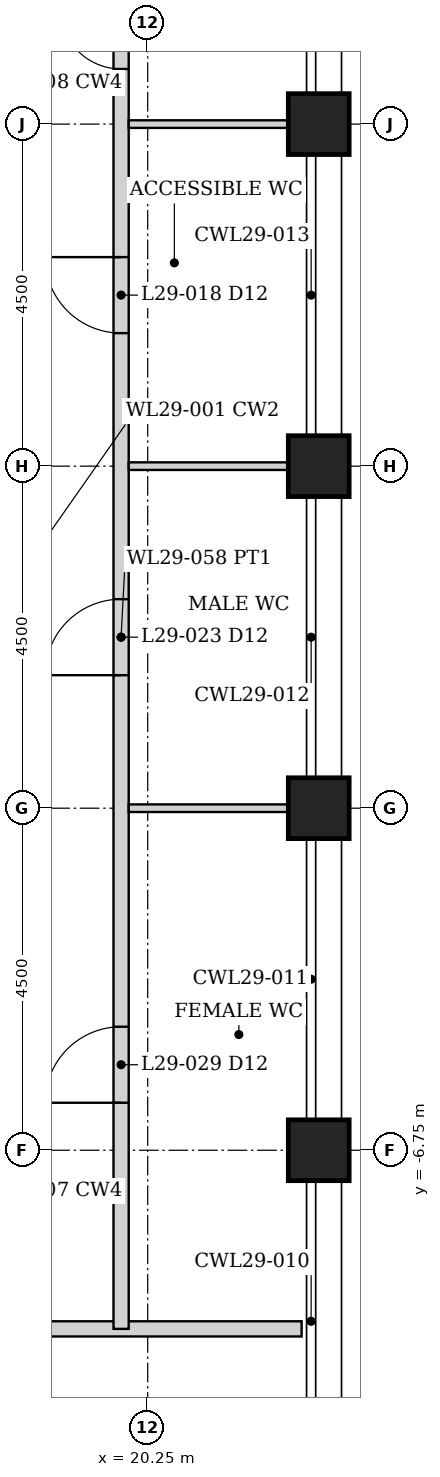
"""IFC4 building model, lengths in metres.
Left out: names, types, materials, properties, quantities, classifications, styles, units other than length and angle.
Written with IfcOpenShell. Run it as: python <this file> out.ifc"""

import sys

from ifc_helpers import new_model, si_unit, direction, frame, frame_2d, origin, origin_2d, place, context, subcontext, project, spatial, rectangle, hollow_rectangle, extrude, element, fill, save


model = new_model("IFC4")
c1 = context("Model", 3, precision=1e-05, world=origin(), true_north=direction((0.0, 1.0)))
c2 = subcontext(c1, "Body", "Model", "MODEL_VIEW")
j1 = project(units=[si_unit("LENGTHUNIT", "METRE"), si_unit("PLANEANGLEUNIT", "RADIAN")], contexts=[c1])
p1 = place(None, origin())
s1 = spatial("IfcSite", under=j1, at=p1, CompositionType="ELEMENT")
p2 = place(p1, origin())
s2 = spatial("IfcBuilding", under=s1, at=p2, CompositionType="ELEMENT")
p3 = place(p2, frame((0.0, 0.0, 112.4)))
s3 = spatial("IfcBuildingStorey", under=s2, at=p3, CompositionType="ELEMENT", Elevation=112.4)
for number, where, z_axis, x_axis in (
    (1, (22.5, -6.75, 0.0), (0.0, 0.0, 1.0), (1.0, 0.0, 0.0)),
    (2, (22.5, -2.25, 0.0), (0.0, 0.0, 1.0), (1.0, 0.0, 0.0)),
    (3, (22.5, 2.25, 0.0), (0.0, 0.0, 1.0), (1.0, 0.0, 0.0)),
    (4, (22.5, 6.75, 0.0), (0.0, 0.0, 1.0), (1.0, 0.0, 0.0)),
):
    element("IfcColumn", number, at=place(p3, frame(where, z_axis=z_axis, x_axis=x_axis)), inside=s3, PredefinedType="COLUMN", context=c2, shape_type="SweptSolid", body=[
        extrude(hollow_rectangle(XDim=0.8, YDim=0.8, WallThickness=0.06, at=origin_2d()), origin(), (0.0, 0.0, 1.0), 6.0),
    ])
p4 = place(p3, frame((-22.275, -9.1, 0.0), z_axis=(0.0, 0.0, 1.0), x_axis=(1.0, 0.0, 0.0)))
e5 = element("IfcWall", 5, at=p4, inside=s3, PredefinedType="PARTITIONING", context=c2, shape_type="SweptSolid", body=[
    extrude(rectangle(XDim=44.55, YDim=0.2, at=frame_2d((22.275, 0.0))), origin(), (0.0, 0.0, 1.0), 4.874),
])
p5 = place(p4, frame((3.348, 0.0, 0.0)))
e6 = element("IfcOpeningElement", 6, at=p5, cuts=e5, PredefinedType="OPENING", context=c2, shape_type="SweptSolid", body=[
    extrude(rectangle(XDim=0.9, YDim=2.1, at=frame_2d((0.45, 1.05))), frame((0.0, 0.11, 0.0), z_axis=(0.0, -1.0, 0.0), x_axis=(1.0, 0.0, 0.0)), (0.0, 0.0, 1.0), 0.22),
])
p6 = place(p4, frame((9.525, 0.0, 0.0)))
e7 = element("IfcOpeningElement", 7, at=p6, cuts=e5, PredefinedType="OPENING", context=c2, shape_type="SweptSolid", body=[
    extrude(rectangle(XDim=1.0, YDim=2.1, at=frame_2d((0.5, 1.05))), frame((0.0, 0.11, 0.0), z_axis=(0.0, -1.0, 0.0), x_axis=(1.0, 0.0, 0.0)), (0.0, 0.0, 1.0), 0.22),
])
p7 = place(p4, frame((13.75, 0.0, 0.0)))
e8 = element("IfcOpeningElement", 8, at=p7, cuts=e5, PredefinedType="OPENING", context=c2, shape_type="SweptSolid", body=[
    extrude(rectangle(XDim=0.8, YDim=2.1, at=frame_2d((0.4, 1.05))), frame((0.0, 0.11, 0.0), z_axis=(0.0, -1.0, 0.0), x_axis=(1.0, 0.0, 0.0)), (0.0, 0.0, 1.0), 0.22),
])
p8 = place(p4, frame((20.817, 0.0, 0.0)))
e9 = element("IfcOpeningElement", 9, at=p8, cuts=e5, PredefinedType="OPENING", context=c2, shape_type="SweptSolid", body=[
    extrude(rectangle(XDim=0.9, YDim=2.1, at=frame_2d((0.45, 1.05))), frame((0.0, 0.11, 0.0), z_axis=(0.0, -1.0, 0.0), x_axis=(1.0, 0.0, 0.0)), (0.0, 0.0, 1.0), 0.22),
])
p9 = place(p4, frame((26.3, 0.0, 0.0)))
e10 = element("IfcOpeningElement", 10, at=p9, cuts=e5, PredefinedType="OPENING", context=c2, shape_type="SweptSolid", body=[
    extrude(rectangle(XDim=0.9, YDim=2.1, at=frame_2d((0.45, 1.05))), frame((0.0, 0.11, 0.0), z_axis=(0.0, -1.0, 0.0), x_axis=(1.0, 0.0, 0.0)), (0.0, 0.0, 1.0), 0.22),
])
p10 = place(p4, frame((16.375, 0.0, 0.0)))
e11 = element("IfcOpeningElement", 11, at=p10, cuts=e5, PredefinedType="OPENING", context=c2, shape_type="SweptSolid", body=[
    extrude(rectangle(XDim=0.8, YDim=2.1, at=frame_2d((0.4, 1.05))), frame((0.0, 0.11, 0.0), z_axis=(0.0, -1.0, 0.0), x_axis=(1.0, 0.0, 0.0)), (0.0, 0.0, 1.0), 0.22),
])
p11 = place(p4, frame((39.811, 0.0, 0.0)))
e12 = element("IfcOpeningElement", 12, at=p11, cuts=e5, PredefinedType="OPENING", context=c2, shape_type="SweptSolid", body=[
    extrude(rectangle(XDim=0.9, YDim=2.1, at=frame_2d((0.45, 1.05))), frame((0.0, 0.11, 0.0), z_axis=(0.0, -1.0, 0.0), x_axis=(1.0, 0.0, 0.0)), (0.0, 0.0, 1.0), 0.22),
])
p12 = place(p4, frame((30.65, 0.0, 0.0)))
e13 = element("IfcOpeningElement", 13, at=p12, cuts=e5, PredefinedType="OPENING", context=c2, shape_type="SweptSolid", body=[
    extrude(rectangle(XDim=1.0, YDim=2.1, at=frame_2d((0.5, 1.05))), frame((0.0, 0.11, 0.0), z_axis=(0.0, -1.0, 0.0), x_axis=(1.0, 0.0, 0.0)), (0.0, 0.0, 1.0), 0.22),
])
p13 = place(p4, frame((34.275, 0.0, 0.0)))
e14 = element("IfcOpeningElement", 14, at=p13, cuts=e5, PredefinedType="OPENING", context=c2, shape_type="SweptSolid", body=[
    extrude(rectangle(XDim=1.0, YDim=2.1, at=frame_2d((0.5, 1.05))), frame((0.0, 0.11, 0.0), z_axis=(0.0, -1.0, 0.0), x_axis=(1.0, 0.0, 0.0)), (0.0, 0.0, 1.0), 0.22),
])
p14 = place(p3, frame((19.9, -9.1, 0.0), z_axis=(0.0, 0.0, 1.0), x_axis=(0.0, 1.0, 0.0)))
e15 = element("IfcWall", 15, at=p14, inside=s3, PredefinedType="PARTITIONING", context=c2, shape_type="SweptSolid", body=[
    extrude(rectangle(XDim=18.2, YDim=0.2, at=frame_2d((9.1, 0.0))), origin(), (0.0, 0.0, 1.0), 4.874),
])
p15 = place(p14, frame((2.975, 0.0, 0.0)))
e16 = element("IfcOpeningElement", 16, at=p15, cuts=e15, PredefinedType="OPENING", context=c2, shape_type="SweptSolid", body=[
    extrude(rectangle(XDim=1.0, YDim=2.1, at=frame_2d((0.5, 1.05))), frame((0.0, 0.11, 0.0), z_axis=(0.0, -1.0, 0.0), x_axis=(1.0, 0.0, 0.0)), (0.0, 0.0, 1.0), 0.22),
])
p16 = place(p14, frame((8.6, 0.0, 0.0)))
e17 = element("IfcOpeningElement", 17, at=p16, cuts=e15, PredefinedType="OPENING", context=c2, shape_type="SweptSolid", body=[
    extrude(rectangle(XDim=1.0, YDim=2.1, at=frame_2d((0.5, 1.05))), frame((0.0, 0.11, 0.0), z_axis=(0.0, -1.0, 0.0), x_axis=(1.0, 0.0, 0.0)), (0.0, 0.0, 1.0), 0.22),
])
p17 = place(p14, frame((13.1, 0.0, 0.0)))
e18 = element("IfcOpeningElement", 18, at=p17, cuts=e15, PredefinedType="OPENING", context=c2, shape_type="SweptSolid", body=[
    extrude(rectangle(XDim=1.0, YDim=2.1, at=frame_2d((0.5, 1.05))), frame((0.0, 0.11, 0.0), z_axis=(0.0, -1.0, 0.0), x_axis=(1.0, 0.0, 0.0)), (0.0, 0.0, 1.0), 0.22),
])
p18 = place(p14, frame((16.575, 0.0, 0.0)))
e19 = element("IfcOpeningElement", 19, at=p18, cuts=e15, PredefinedType="OPENING", context=c2, shape_type="SweptSolid", body=[
    extrude(rectangle(XDim=0.8, YDim=2.1, at=frame_2d((0.4, 1.05))), frame((0.0, 0.11, 0.0), z_axis=(0.0, -1.0, 0.0), x_axis=(1.0, 0.0, 0.0)), (0.0, 0.0, 1.0), 0.22),
])
for number, where, z_axis, x_axis in (
    (20, (20.0, -2.25, 0.0), (0.0, 0.0, 1.0), (1.0, 0.0, 0.0)),
    (21, (20.0, 2.25, 0.0), (0.0, 0.0, 1.0), (1.0, 0.0, 0.0)),
    (22, (20.0, 6.75, 0.0), (0.0, 0.0, 1.0), (1.0, 0.0, 0.0)),
):
    element("IfcWall", number, at=place(p3, frame(where, z_axis=z_axis, x_axis=x_axis)), inside=s3, PredefinedType="PARTITIONING", context=c2, shape_type="SweptSolid", body=[
        extrude(rectangle(XDim=2.1, YDim=0.1, at=frame_2d((1.05, 0.0))), origin(), (0.0, 0.0, 1.0), 4.874),
    ])
p19 = place(p15, origin())
e23 = element("IfcDoor", 23, at=p19, inside=s3, OperationType="SINGLE_SWING_LEFT", PredefinedType="DOOR", context=c2, shape_type="SweptSolid", body=[
    extrude(rectangle(XDim=1.0, YDim=2.1, at=frame_2d((0.5, 1.05))), frame((0.0, 0.025, 0.0), z_axis=(0.0, -1.0, 0.0), x_axis=(1.0, 0.0, 0.0)), (0.0, 0.0, 1.0), 0.05),
])
fill(e16, e23)
p20 = place(p16, origin())
e24 = element("IfcDoor", 24, at=p20, inside=s3, OperationType="SINGLE_SWING_LEFT", PredefinedType="DOOR", context=c2, shape_type="SweptSolid", body=[
    extrude(rectangle(XDim=1.0, YDim=2.1, at=frame_2d((0.5, 1.05))), frame((0.0, 0.025, 0.0), z_axis=(0.0, -1.0, 0.0), x_axis=(1.0, 0.0, 0.0)), (0.0, 0.0, 1.0), 0.05),
])
fill(e17, e24)
p21 = place(p17, origin())
e25 = element("IfcDoor", 25, at=p21, inside=s3, OperationType="SINGLE_SWING_RIGHT", PredefinedType="DOOR", context=c2, shape_type="SweptSolid", body=[
    extrude(rectangle(XDim=1.0, YDim=2.1, at=frame_2d((0.5, 1.05))), frame((0.0, 0.025, 0.0), z_axis=(0.0, -1.0, 0.0), x_axis=(1.0, 0.0, 0.0)), (0.0, 0.0, 1.0), 0.05),
])
fill(e18, e25)
p22 = place(p18, origin())
e26 = element("IfcDoor", 26, at=p22, inside=s3, OperationType="SINGLE_SWING_RIGHT", PredefinedType="DOOR", context=c2, shape_type="SweptSolid", body=[
    extrude(rectangle(XDim=0.8, YDim=2.1, at=frame_2d((0.4, 1.05))), frame((0.0, 0.025, 0.0), z_axis=(0.0, -1.0, 0.0), x_axis=(1.0, 0.0, 0.0)), (0.0, 0.0, 1.0), 0.05),
])
fill(e19, e26)
save(model, sys.argv[1])
